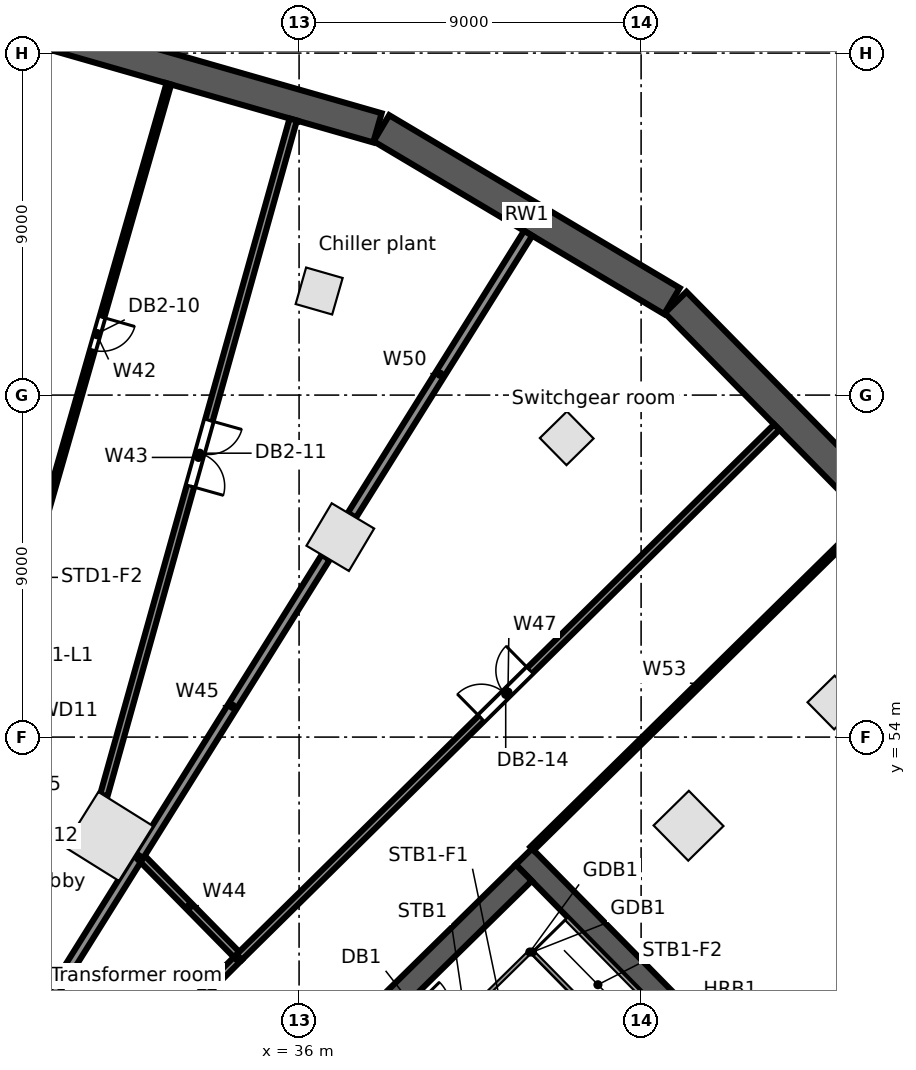
"""IFC4 building model, lengths in metres.
Left out: names, types, materials, properties, quantities, classifications, styles, units other than length and angle.
Written with IfcOpenShell. Run it as: python <this file> out.ifc"""

import sys

from ifc_helpers import new_model, si_unit, direction, frame, frame_2d, origin, origin_2d, place, context, subcontext, project, spatial, rectangle, extrude, element, fill, save


model = new_model("IFC4")
c1 = context("Model", 3, precision=1e-05, world=origin(), true_north=direction((0.0, 1.0)))
c2 = subcontext(c1, "Body", "Model", "MODEL_VIEW")
j1 = project(units=[si_unit("LENGTHUNIT", "METRE"), si_unit("PLANEANGLEUNIT", "RADIAN")], contexts=[c1])
p1 = place(None, origin())
s1 = spatial("IfcSite", under=j1, at=p1, CompositionType="ELEMENT")
p2 = place(p1, origin())
s2 = spatial("IfcBuilding", under=s1, at=p2, CompositionType="ELEMENT")
p3 = place(p2, frame((0.0, 0.0, -9.6)))
s3 = spatial("IfcBuildingStorey", under=s2, at=p3, CompositionType="ELEMENT", Elevation=-9.6)
p4 = place(p3, frame((45.811, 65.474, -0.5), z_axis=(0.0, 0.0, 1.0), x_axis=(-0.859404871468, 0.511295674632, 0.0)))
e1 = element("IfcWall", 1, at=p4, inside=s3, PredefinedType="SOLIDWALL", context=c2, shape_type="SweptSolid", body=[
    extrude(rectangle(XDim=8.896, YDim=0.8, at=frame_2d((4.448, 0.0))), origin(), (0.0, 0.0, 1.0), 5.3),
])
p5 = place(p3, frame((38.062, 70.032, -0.5), z_axis=(0.0, 0.0, 1.0), x_axis=(-0.961260654426, 0.275640987977, 0.0)))
e2 = element("IfcWall", 2, at=p5, inside=s3, PredefinedType="SOLIDWALL", context=c2, shape_type="SweptSolid", body=[
    extrude(rectangle(XDim=35.435, YDim=0.8, at=frame_2d((17.718, 0.0))), origin(), (0.0, 0.0, 1.0), 5.3),
])
p6 = place(p3, frame((67.655, 43.309, -0.5), z_axis=(0.0, 0.0, 1.0), x_axis=(-0.700910545602, 0.713249190019, 0.0)))
e3 = element("IfcWall", 3, at=p6, inside=s3, PredefinedType="SOLIDWALL", context=c2, shape_type="SweptSolid", body=[
    extrude(rectangle(XDim=31.025, YDim=0.8, at=frame_2d((15.513, 0.0))), origin(), (0.0, 0.0, 1.0), 5.3),
])
for number, where, z_axis, x_axis in (
    (4, (37.085, 59.262, -0.5), (0.0, 0.0, 1.0), (-0.859, 0.511, 0.0)),
    (5, (46.248, 51.667, -0.5), (0.0, 0.0, 1.0), (-0.701, 0.713, 0.0)),
):
    element("IfcColumn", number, at=place(p3, frame(where, z_axis=z_axis, x_axis=x_axis)), inside=s3, PredefinedType="COLUMN", context=c2, shape_type="SweptSolid", body=[
        extrude(rectangle(XDim=1.3, YDim=1.3, at=origin_2d()), origin(), (0.0, 0.0, 1.0), 5.3),
    ])
p7 = place(p3, frame((30.99, 51.386, -0.5), z_axis=(0.0, 0.0, 1.0), x_axis=(0.529919264233, 0.848048096156, 0.0)))
e6 = element("IfcColumn", 6, at=p7, inside=s3, PredefinedType="COLUMN", context=c2, shape_type="SweptSolid", body=[
    extrude(rectangle(XDim=1.7, YDim=1.7, at=origin_2d()), origin(), (0.0, 0.0, 1.0), 5.3),
])
for number, where, z_axis, x_axis in (
    (7, (36.528, 65.739, -0.5), (0.0, 0.0, 1.0), (-0.961, 0.276, 0.0)),
    (8, (50.086, 54.91, -0.5), (0.0, 0.0, 1.0), (-0.701, 0.713, 0.0)),
    (9, (43.042, 61.863, -0.5), (0.0, 0.0, 1.0), (-0.701, 0.713, 0.0)),
):
    element("IfcColumn", number, at=place(p3, frame(where, z_axis=z_axis, x_axis=x_axis)), inside=s3, PredefinedType="COLUMN", context=c2, shape_type="SweptSolid", body=[
        extrude(rectangle(XDim=1.0, YDim=1.0, at=origin_2d()), origin(), (0.0, 0.0, 1.0), 5.3),
    ])
p8 = place(p3, frame((41.917, 50.856, 0.0), z_axis=(0.0, 0.0, 1.0), x_axis=(0.700911255944, -0.713248491965, 0.0)))
e10 = element("IfcWall", 10, at=p8, inside=s3, PredefinedType="SOLIDWALL", context=c2, shape_type="SweptSolid", body=[
    extrude(rectangle(XDim=15.0, YDim=0.6, at=frame_2d((7.5, 0.0))), origin(), (0.0, 0.0, 1.0), 4.4),
])
p9 = place(p3, frame((32.07, 40.759, 0.0), z_axis=(0.0, 0.0, 1.0), x_axis=(0.713245344712, 0.70091445858, 0.0)))
e11 = element("IfcWall", 11, at=p9, inside=s3, PredefinedType="SOLIDWALL", context=c2, shape_type="SweptSolid", body=[
    extrude(rectangle(XDim=13.8, YDim=0.6, at=frame_2d((6.9, 0.0))), origin(), (0.0, 0.0, 1.0), 4.4),
])
p10 = place(p3, frame((23.618, 37.379, 0.0), z_axis=(0.0, 0.0, 1.0), x_axis=(0.706356332605, 0.707856434165, 0.0)))
e12 = element("IfcWall", 12, at=p10, inside=s3, PredefinedType="PARTITIONING", context=c2, shape_type="SweptSolid", body=[
    extrude(rectangle(XDim=15.298, YDim=0.2, at=frame_2d((7.649, 0.0))), origin(), (0.0, 0.0, 1.0), 3.572),
])
p11 = place(p10, frame((6.7, 0.0, 0.0)))
e13 = element("IfcOpeningElement", 13, at=p11, cuts=e12, PredefinedType="OPENING", context=c2, shape_type="SweptSolid", body=[
    extrude(rectangle(XDim=1.8, YDim=2.1, at=frame_2d((0.9, 1.05))), frame((0.0, 0.11, 0.0), z_axis=(0.0, -1.0, 0.0), x_axis=(1.0, 0.0, 0.0)), (0.0, 0.0, 1.0), 0.22),
])
p12 = place(p3, frame((26.456, 42.338, 0.0), z_axis=(0.0, 0.0, 1.0), x_axis=(0.529866075757, 0.848081329686, 0.0)))
e14 = element("IfcWall", 14, at=p12, inside=s3, PredefinedType="PARTITIONING", context=c2, shape_type="SweptSolid", body=[
    extrude(rectangle(XDim=10.076, YDim=0.25, at=frame_2d((5.038, 0.0))), origin(), (0.0, 0.0, 1.0), 3.462),
])
p13 = place(p3, frame((28.787, 57.987, 0.0), z_axis=(0.0, 0.0, 1.0), x_axis=(0.27563893724, 0.961261242471, 0.0)))
e15 = element("IfcWall", 15, at=p13, inside=s3, PredefinedType="PARTITIONING", context=c2, shape_type="SweptSolid", body=[
    extrude(rectangle(XDim=13.735, YDim=0.125, at=frame_2d((6.867, 0.0))), origin(), (0.0, 0.0, 1.0), 3.68),
])
p14 = place(p13, frame((6.45, 0.0, 0.0)))
e16 = element("IfcOpeningElement", 16, at=p14, cuts=e15, PredefinedType="OPENING", context=c2, shape_type="SweptSolid", body=[
    extrude(rectangle(XDim=0.9, YDim=2.1, at=frame_2d((0.45, 1.05))), frame((0.0, 0.073, 0.0), z_axis=(0.0, -1.0, 0.0), x_axis=(1.0, 0.0, 0.0)), (0.0, 0.0, 1.0), 0.145),
])
p15 = place(p3, frame((30.862, 52.468, 0.0), z_axis=(0.0, 0.0, 1.0), x_axis=(0.269850069582, 0.962902352238, 0.0)))
e17 = element("IfcWall", 17, at=p15, inside=s3, PredefinedType="PARTITIONING", context=c2, shape_type="SweptSolid", body=[
    extrude(rectangle(XDim=18.469, YDim=0.2, at=frame_2d((9.234, 0.0))), origin(), (0.0, 0.0, 1.0), 3.68),
])
p16 = place(p15, frame((8.45, 0.0, 0.0)))
e18 = element("IfcOpeningElement", 18, at=p16, cuts=e17, PredefinedType="OPENING", context=c2, shape_type="SweptSolid", body=[
    extrude(rectangle(XDim=1.8, YDim=2.1, at=frame_2d((0.9, 1.05))), frame((0.0, 0.11, 0.0), z_axis=(0.0, -1.0, 0.0), x_axis=(1.0, 0.0, 0.0)), (0.0, 0.0, 1.0), 0.22),
])
p17 = place(p3, frame((31.795, 50.883, 0.0), z_axis=(0.0, 0.0, 1.0), x_axis=(0.700961783082, -0.713198835289, 0.0)))
e19 = element("IfcWall", 19, at=p17, inside=s3, PredefinedType="PARTITIONING", context=c2, shape_type="SweptSolid", body=[
    extrude(rectangle(XDim=3.751, YDim=0.2, at=frame_2d((1.875, 0.0))), origin(), (0.0, 0.0, 1.0), 3.572),
])
p18 = place(p3, frame((31.795, 50.883, 0.0), z_axis=(0.0, 0.0, 1.0), x_axis=(0.529939676421, 0.848035340864, 0.0)))
e20 = element("IfcWall", 20, at=p18, inside=s3, PredefinedType="PARTITIONING", context=c2, shape_type="SweptSolid", body=[
    extrude(rectangle(XDim=9.258, YDim=0.25, at=frame_2d((4.629, 0.0))), origin(), (0.0, 0.0, 1.0), 3.572),
])
p19 = place(p3, frame((34.424, 48.208, 0.0), z_axis=(0.0, 0.0, 1.0), x_axis=(0.711998848244, 0.702180632102, 0.0)))
e21 = element("IfcWall", 21, at=p19, inside=s3, PredefinedType="PARTITIONING", context=c2, shape_type="SweptSolid", body=[
    extrude(rectangle(XDim=19.868, YDim=0.2, at=frame_2d((9.934, 0.0))), origin(), (0.0, 0.0, 1.0), 3.672),
])
p20 = place(p19, frame((8.95, 0.0, 0.0)))
e22 = element("IfcOpeningElement", 22, at=p20, cuts=e21, PredefinedType="OPENING", context=c2, shape_type="SweptSolid", body=[
    extrude(rectangle(XDim=1.8, YDim=2.1, at=frame_2d((0.9, 1.05))), frame((0.0, 0.11, 0.0), z_axis=(0.0, -1.0, 0.0), x_axis=(1.0, 0.0, 0.0)), (0.0, 0.0, 1.0), 0.22),
])
p21 = place(p3, frame((37.39, 59.837, 0.0), z_axis=(0.0, 0.0, 1.0), x_axis=(0.529946283542, 0.84803121202, 0.0)))
e23 = element("IfcWall", 23, at=p21, inside=s3, PredefinedType="PARTITIONING", context=c2, shape_type="SweptSolid", body=[
    extrude(rectangle(XDim=8.752, YDim=0.25, at=frame_2d((4.376, 0.0))), origin(), (0.0, 0.0, 1.0), 3.78),
])
p22 = place(p3, frame((42.13, 51.066, 0.0), z_axis=(0.0, 0.0, 1.0), x_axis=(0.713258003964, 0.700901576387, 0.0)))
e24 = element("IfcWall", 24, at=p22, inside=s3, PredefinedType="PARTITIONING", context=c2, shape_type="SweptSolid", body=[
    extrude(rectangle(XDim=12.369, YDim=0.125, at=frame_2d((6.184, 0.0))), origin(), (0.0, 0.0, 1.0), 3.672),
])
p23 = place(p14, frame((0.9, 0.0, 0.0), z_axis=(0.0, 0.0, 1.0), x_axis=(-1.0, 0.0, 0.0)))
e25 = element("IfcDoor", 25, at=p23, inside=s3, OperationType="SINGLE_SWING_LEFT", PredefinedType="DOOR", context=c2, shape_type="SweptSolid", body=[
    extrude(rectangle(XDim=0.9, YDim=2.1, at=frame_2d((0.45, 1.05))), frame((0.0, 0.025, 0.0), z_axis=(0.0, -1.0, 0.0), x_axis=(1.0, 0.0, 0.0)), (0.0, 0.0, 1.0), 0.05),
])
fill(e16, e25)
p24 = place(p16, frame((1.8, 0.0, 0.0), z_axis=(0.0, 0.0, 1.0), x_axis=(-1.0, 0.0, 0.0)))
e26 = element("IfcDoor", 26, at=p24, inside=s3, OperationType="DOUBLE_DOOR_SINGLE_SWING", PredefinedType="DOOR", context=c2, shape_type="SweptSolid", body=[
    extrude(rectangle(XDim=1.8, YDim=2.1, at=frame_2d((0.9, 1.05))), frame((0.0, 0.025, 0.0), z_axis=(0.0, -1.0, 0.0), x_axis=(1.0, 0.0, 0.0)), (0.0, 0.0, 1.0), 0.05),
])
fill(e18, e26)
p25 = place(p20, origin())
e27 = element("IfcDoor", 27, at=p25, inside=s3, OperationType="DOUBLE_DOOR_SINGLE_SWING", PredefinedType="DOOR", context=c2, shape_type="SweptSolid", body=[
    extrude(rectangle(XDim=1.8, YDim=2.1, at=frame_2d((0.9, 1.05))), frame((0.0, 0.025, 0.0), z_axis=(0.0, -1.0, 0.0), x_axis=(1.0, 0.0, 0.0)), (0.0, 0.0, 1.0), 0.05),
])
fill(e22, e27)
save(model, sys.argv[1])
